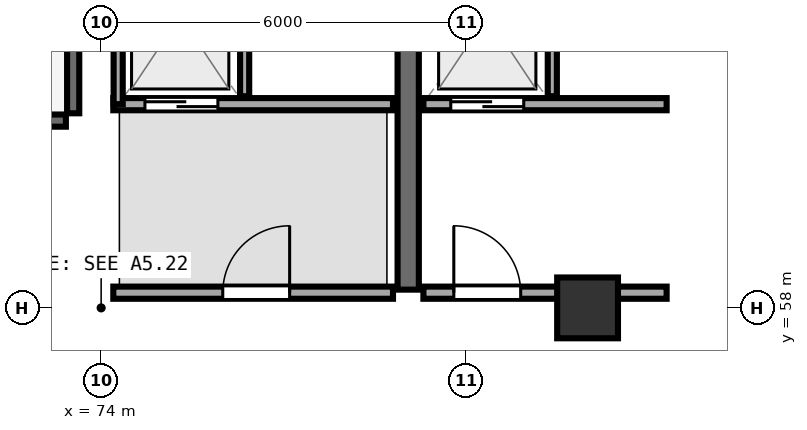
"""IFC4 building model, lengths in metres.
Left out: names, types, materials, properties, quantities, classifications, styles, units other than length and angle.
Written with IfcOpenShell. Run it as: python <this file> out.ifc"""

import sys

from ifc_helpers import new_model, si_unit, direction, frame, frame_2d, origin, origin_2d, place, context, subcontext, project, spatial, rectangle, extrude, element, fill, save


model = new_model("IFC4")
c1 = context("Model", 3, precision=1e-05, world=origin(), true_north=direction((0.0, 1.0)))
c2 = subcontext(c1, "Body", "Model", "MODEL_VIEW")
j1 = project(units=[si_unit("LENGTHUNIT", "METRE"), si_unit("PLANEANGLEUNIT", "RADIAN")], contexts=[c1])
p1 = place(None, origin())
s1 = spatial("IfcSite", under=j1, at=p1, CompositionType="ELEMENT")
p2 = place(p1, origin())
s2 = spatial("IfcBuilding", under=s1, at=p2, CompositionType="ELEMENT")
p3 = place(p2, frame((0.0, 0.0, 293.7)))
s3 = spatial("IfcBuildingStorey", under=s2, at=p3, CompositionType="ELEMENT", Elevation=293.7)
p4 = place(p3, frame((82.0, 58.0, 0.0), z_axis=(0.0, 0.0, 1.0), x_axis=(1.0, 0.0, 0.0)))
e1 = element("IfcColumn", 1, at=p4, inside=s3, PredefinedType="PILASTER", context=c2, shape_type="SweptSolid", body=[
    extrude(rectangle(XDim=1.0, YDim=1.0, at=origin_2d()), origin(), (0.0, 0.0, 1.0), 4.8),
])
p5 = place(p3, frame((66.26, 61.08, 0.0), z_axis=(0.0, 0.0, 1.0), x_axis=(1.0, 0.0, 0.0)))
e2 = element("IfcWall", 2, at=p5, inside=s3, PredefinedType="SHEAR", context=c2, shape_type="SweptSolid", body=[
    extrude(rectangle(XDim=7.16, YDim=0.2, at=frame_2d((3.58, 0.0))), origin(), (0.0, 0.0, 1.0), 4.54),
])
p6 = place(p3, frame((73.54, 61.2, 0.0), z_axis=(0.0, 0.0, 1.0), x_axis=(0.0, 1.0, 0.0)))
e3 = element("IfcWall", 3, at=p6, inside=s3, PredefinedType="SHEAR", context=c2, shape_type="SweptSolid", body=[
    extrude(rectangle(XDim=3.07, YDim=0.2, at=frame_2d((1.535, 0.0))), origin(), (0.0, 0.0, 1.0), 4.54),
])
p7 = place(p3, frame((79.05, 58.3, 0.0), z_axis=(0.0, 0.0, 1.0), x_axis=(0.0, 1.0, 0.0)))
e4 = element("IfcWall", 4, at=p7, inside=s3, PredefinedType="SHEAR", context=c2, shape_type="SweptSolid", body=[
    extrude(rectangle(XDim=6.3, YDim=0.35, at=frame_2d((3.15, 0.0))), origin(), (0.0, 0.0, 1.0), 4.54),
])
p8 = place(p3, frame((74.2, 61.35, 0.0), z_axis=(0.0, 0.0, 1.0), x_axis=(1.0, 0.0, 0.0)))
e5 = element("IfcWall", 5, at=p8, inside=s3, PredefinedType="SOLIDWALL", context=c2, shape_type="SweptSolid", body=[
    extrude(rectangle(XDim=4.6, YDim=0.2, at=frame_2d((2.3, 0.0))), origin(), (0.0, 0.0, 1.0), 4.53),
])
p9 = place(p8, frame((0.52, 0.0, 0.0)))
e6 = element("IfcOpeningElement", 6, at=p9, cuts=e5, PredefinedType="OPENING", context=c2, shape_type="SweptSolid", body=[
    extrude(rectangle(XDim=1.2, YDim=2.15, at=frame_2d((0.6, 1.075))), frame((0.0, 0.11, 0.0), z_axis=(0.0, -1.0, 0.0), x_axis=(1.0, 0.0, 0.0)), (0.0, 0.0, 1.0), 0.22),
])
p10 = place(p3, frame((74.28, 61.35, 0.0), z_axis=(0.0, 0.0, 1.0), x_axis=(0.0, 1.0, 0.0)))
e7 = element("IfcWall", 7, at=p10, inside=s3, PredefinedType="PARTITIONING", context=c2, shape_type="SweptSolid", body=[
    extrude(rectangle(XDim=2.97, YDim=0.15, at=frame_2d((1.485, 0.0))), origin(), (0.0, 0.0, 1.0), 4.53),
])
p11 = place(p3, frame((76.36, 61.48, 0.0), z_axis=(0.0, 0.0, 1.0), x_axis=(0.0, 1.0, 0.0)))
e8 = element("IfcWall", 8, at=p11, inside=s3, PredefinedType="PARTITIONING", context=c2, shape_type="SweptSolid", body=[
    extrude(rectangle(XDim=2.84, YDim=0.15, at=frame_2d((1.42, 0.0))), origin(), (0.0, 0.0, 1.0), 4.53),
])
p12 = place(p3, frame((79.3, 61.35, 0.0), z_axis=(0.0, 0.0, 1.0), x_axis=(1.0, 0.0, 0.0)))
e9 = element("IfcWall", 9, at=p12, inside=s3, PredefinedType="SOLIDWALL", context=c2, shape_type="SweptSolid", body=[
    extrude(rectangle(XDim=4.0, YDim=0.2, at=frame_2d((2.0, 0.0))), origin(), (0.0, 0.0, 1.0), 3.825),
])
p13 = place(p12, frame((0.45, 0.0, 0.0)))
e10 = element("IfcOpeningElement", 10, at=p13, cuts=e9, PredefinedType="OPENING", context=c2, shape_type="SweptSolid", body=[
    extrude(rectangle(XDim=1.2, YDim=2.15, at=frame_2d((0.6, 1.075))), frame((0.0, 0.11, 0.0), z_axis=(0.0, -1.0, 0.0), x_axis=(1.0, 0.0, 0.0)), (0.0, 0.0, 1.0), 0.22),
])
p14 = place(p3, frame((81.42, 61.48, 0.0), z_axis=(0.0, 0.0, 1.0), x_axis=(0.0, 1.0, 0.0)))
e11 = element("IfcWall", 11, at=p14, inside=s3, PredefinedType="PARTITIONING", context=c2, shape_type="SweptSolid", body=[
    extrude(rectangle(XDim=2.84, YDim=0.15, at=frame_2d((1.42, 0.0))), origin(), (0.0, 0.0, 1.0), 4.53),
])
p15 = place(p3, frame((74.2, 58.25, 0.0), z_axis=(0.0, 0.0, 1.0), x_axis=(1.0, 0.0, 0.0)))
e12 = element("IfcWall", 12, at=p15, inside=s3, PredefinedType="SOLIDWALL", context=c2, shape_type="SweptSolid", body=[
    extrude(rectangle(XDim=4.6, YDim=0.2, at=frame_2d((2.3, 0.0))), origin(), (0.0, 0.0, 1.0), 4.53),
])
p16 = place(p15, frame((1.8, 0.0, 0.0)))
e13 = element("IfcOpeningElement", 13, at=p16, cuts=e12, PredefinedType="OPENING", context=c2, shape_type="SweptSolid", body=[
    extrude(rectangle(XDim=1.1, YDim=2.1, at=frame_2d((0.55, 1.05))), frame((0.0, 0.11, 0.0), z_axis=(0.0, -1.0, 0.0), x_axis=(1.0, 0.0, 0.0)), (0.0, 0.0, 1.0), 0.22),
])
p17 = place(p3, frame((79.3, 58.25, 0.0), z_axis=(0.0, 0.0, 1.0), x_axis=(1.0, 0.0, 0.0)))
e14 = element("IfcWall", 14, at=p17, inside=s3, PredefinedType="SOLIDWALL", context=c2, shape_type="SweptSolid", body=[
    extrude(rectangle(XDim=4.0, YDim=0.2, at=frame_2d((2.0, 0.0))), origin(), (0.0, 0.0, 1.0), 2.525),
])
p18 = place(p17, frame((0.5, 0.0, 0.0)))
e15 = element("IfcOpeningElement", 15, at=p18, cuts=e14, PredefinedType="OPENING", context=c2, shape_type="SweptSolid", body=[
    extrude(rectangle(XDim=1.1, YDim=2.1, at=frame_2d((0.55, 1.05))), frame((0.0, 0.11, 0.0), z_axis=(0.0, -1.0, 0.0), x_axis=(1.0, 0.0, 0.0)), (0.0, 0.0, 1.0), 0.22),
])
p19 = place(p9, origin())
e16 = element("IfcDoor", 16, at=p19, inside=s3, OperationType="DOUBLE_DOOR_SLIDING", PredefinedType="DOOR", context=c2, shape_type="SweptSolid", body=[
    extrude(rectangle(XDim=1.2, YDim=2.15, at=frame_2d((0.6, 1.075))), frame((0.0, 0.025, 0.0), z_axis=(0.0, -1.0, 0.0), x_axis=(1.0, 0.0, 0.0)), (0.0, 0.0, 1.0), 0.05),
])
fill(e6, e16)
p20 = place(p13, origin())
e17 = element("IfcDoor", 17, at=p20, inside=s3, OperationType="DOUBLE_DOOR_SLIDING", PredefinedType="DOOR", context=c2, shape_type="SweptSolid", body=[
    extrude(rectangle(XDim=1.2, YDim=2.15, at=frame_2d((0.6, 1.075))), frame((0.0, 0.025, 0.0), z_axis=(0.0, -1.0, 0.0), x_axis=(1.0, 0.0, 0.0)), (0.0, 0.0, 1.0), 0.05),
])
fill(e10, e17)
p21 = place(p16, frame((1.1, 0.0, 0.0), z_axis=(0.0, 0.0, 1.0), x_axis=(-1.0, 0.0, 0.0)))
e18 = element("IfcDoor", 18, at=p21, inside=s3, OperationType="SINGLE_SWING_LEFT", PredefinedType="DOOR", context=c2, shape_type="SweptSolid", body=[
    extrude(rectangle(XDim=1.1, YDim=2.1, at=frame_2d((0.55, 1.05))), frame((0.0, 0.025, 0.0), z_axis=(0.0, -1.0, 0.0), x_axis=(1.0, 0.0, 0.0)), (0.0, 0.0, 1.0), 0.05),
])
fill(e13, e18)
p22 = place(p18, frame((1.1, 0.0, 0.0), z_axis=(0.0, 0.0, 1.0), x_axis=(-1.0, 0.0, 0.0)))
e19 = element("IfcDoor", 19, at=p22, inside=s3, OperationType="SINGLE_SWING_RIGHT", PredefinedType="DOOR", context=c2, shape_type="SweptSolid", body=[
    extrude(rectangle(XDim=1.1, YDim=2.1, at=frame_2d((0.55, 1.05))), frame((0.0, 0.025, 0.0), z_axis=(0.0, -1.0, 0.0), x_axis=(1.0, 0.0, 0.0)), (0.0, 0.0, 1.0), 0.05),
])
fill(e15, e19)
save(model, sys.argv[1])
